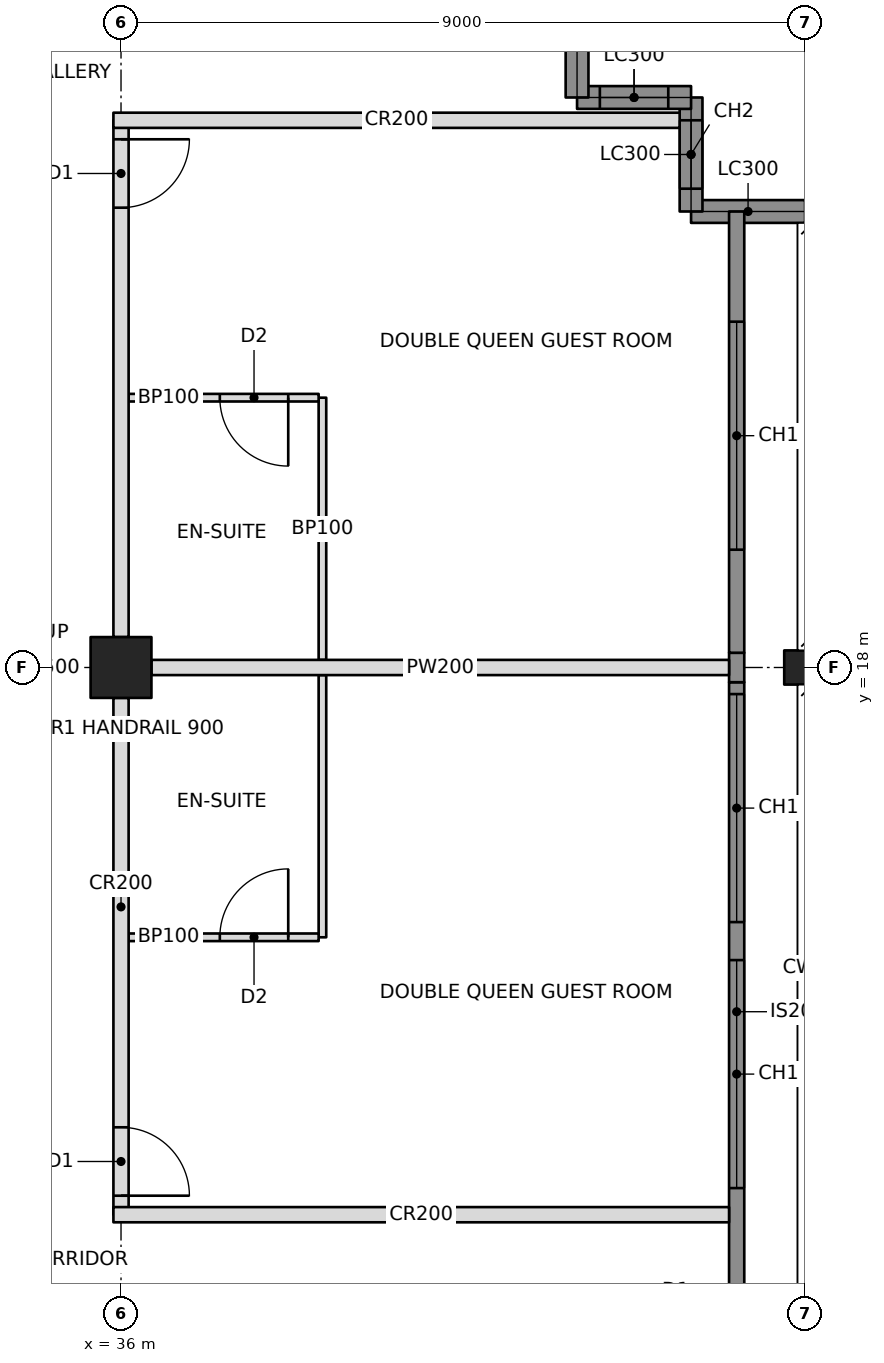
"""IFC4 building model, lengths in metres.
Left out: names, types, materials, properties, quantities, classifications, styles, units other than length and angle.
Written with IfcOpenShell. Run it as: python <this file> out.ifc"""

import sys

from ifc_helpers import new_model, si_unit, direction, frame, frame_2d, origin, origin_2d, place, context, subcontext, project, spatial, rectangle, hollow_rectangle, i_section, extrude, element, fill, save


model = new_model("IFC4")
c1 = context("Model", 3, precision=1e-05, world=origin(), true_north=direction((0.0, 1.0)))
c2 = subcontext(c1, "Body", "Model", "MODEL_VIEW")
j1 = project(units=[si_unit("LENGTHUNIT", "METRE"), si_unit("PLANEANGLEUNIT", "RADIAN")], contexts=[c1])
p1 = place(None, origin())
s1 = spatial("IfcSite", under=j1, at=p1, CompositionType="ELEMENT")
p2 = place(p1, origin())
s2 = spatial("IfcBuilding", under=s1, at=p2, CompositionType="ELEMENT")
p3 = place(p2, frame((0.0, 0.0, 191.0)))
s3 = spatial("IfcBuildingStorey", under=s2, at=p3, CompositionType="ELEMENT", Elevation=191.0)
p4 = place(p3, frame((36.0, 18.0, 0.0), z_axis=(0.0, 0.0, 1.0), x_axis=(0.0, 1.0, 0.0)))
e1 = element("IfcColumn", 1, at=p4, inside=s3, PredefinedType="COLUMN", context=c2, shape_type="SweptSolid", body=[
    extrude(hollow_rectangle(XDim=0.8, YDim=0.8, WallThickness=0.06, at=origin_2d()), origin(), (0.0, 0.0, 1.0), 3.4),
])
p5 = place(p3, frame((45.0, 18.0, 0.0), z_axis=(0.0, 0.0, 1.0), x_axis=(0.0, 1.0, 0.0)))
e2 = element("IfcColumn", 2, at=p5, inside=s3, PredefinedType="COLUMN", context=c2, shape_type="SweptSolid", body=[
    extrude(i_section(OverallWidth=0.449, OverallDepth=0.549, WebThickness=0.072, FlangeThickness=0.115, at=origin_2d()), origin(), (0.0, 0.0, 1.0), 3.4),
])
p6 = place(p3, frame((45.0, 24.0, 0.0), z_axis=(0.0, 0.0, 1.0), x_axis=(-1.0, 0.0, 0.0)))
e3 = element("IfcWall", 3, at=p6, inside=s3, PredefinedType="SOLIDWALL", context=c2, shape_type="SweptSolid", body=[
    extrude(rectangle(XDim=1.5, YDim=0.3, at=frame_2d((0.75, 0.0))), origin(), (0.0, 0.0, 1.0), 2.42),
])
p7 = place(p3, frame((43.5, 24.0, 0.0), z_axis=(0.0, 0.0, 1.0), x_axis=(0.0, 1.0, 0.0)))
e4 = element("IfcWall", 4, at=p7, inside=s3, PredefinedType="SOLIDWALL", context=c2, shape_type="SweptSolid", body=[
    extrude(rectangle(XDim=1.5, YDim=0.3, at=frame_2d((0.75, 0.0))), origin(), (0.0, 0.0, 1.0), 3.2),
])
p8 = place(p7, frame((0.3, 0.0, 0.6)))
e5 = element("IfcOpeningElement", 5, at=p8, cuts=e4, PredefinedType="OPENING", context=c2, shape_type="SweptSolid", body=[
    extrude(rectangle(XDim=0.9, YDim=2.2, at=frame_2d((0.45, 1.1))), frame((0.0, 0.16, 0.0), z_axis=(0.0, -1.0, 0.0), x_axis=(1.0, 0.0, 0.0)), (0.0, 0.0, 1.0), 0.32),
])
p9 = place(p3, frame((43.5, 25.5, 0.0), z_axis=(0.0, 0.0, 1.0), x_axis=(-1.0, 0.0, 0.0)))
e6 = element("IfcWall", 6, at=p9, inside=s3, PredefinedType="SOLIDWALL", context=c2, shape_type="SweptSolid", body=[
    extrude(rectangle(XDim=1.5, YDim=0.3, at=frame_2d((0.75, 0.0))), origin(), (0.0, 0.0, 1.0), 3.2),
])
p10 = place(p9, frame((0.3, 0.0, 0.6)))
e7 = element("IfcOpeningElement", 7, at=p10, cuts=e6, PredefinedType="OPENING", context=c2, shape_type="SweptSolid", body=[
    extrude(rectangle(XDim=0.9, YDim=2.2, at=frame_2d((0.45, 1.1))), frame((0.0, 0.16, 0.0), z_axis=(0.0, -1.0, 0.0), x_axis=(1.0, 0.0, 0.0)), (0.0, 0.0, 1.0), 0.32),
])
p11 = place(p3, frame((42.0, 25.5, 0.0), z_axis=(0.0, 0.0, 1.0), x_axis=(0.0, 1.0, 0.0)))
e8 = element("IfcWall", 8, at=p11, inside=s3, PredefinedType="SOLIDWALL", context=c2, shape_type="SweptSolid", body=[
    extrude(rectangle(XDim=1.5, YDim=0.3, at=frame_2d((0.75, 0.0))), origin(), (0.0, 0.0, 1.0), 2.42),
])
p12 = place(p3, frame((36.0, 10.8, 0.0), z_axis=(0.0, 0.0, 1.0), x_axis=(0.0, 1.0, 0.0)))
e9 = element("IfcWall", 9, at=p12, inside=s3, PredefinedType="PARTITIONING", context=c2, shape_type="SweptSolid", body=[
    extrude(rectangle(XDim=6.8, YDim=0.2, at=frame_2d((3.4, 0.0))), origin(), (0.0, 0.0, 1.0), 2.405),
])
p13 = place(p12, frame((0.25, 0.0, 0.0)))
e10 = element("IfcOpeningElement", 10, at=p13, cuts=e9, PredefinedType="OPENING", context=c2, shape_type="SweptSolid", body=[
    extrude(rectangle(XDim=0.9, YDim=2.1, at=frame_2d((0.45, 1.05))), frame((0.0, 0.11, 0.0), z_axis=(0.0, -1.0, 0.0), x_axis=(1.0, 0.0, 0.0)), (0.0, 0.0, 1.0), 0.22),
])
p14 = place(p3, frame((36.0, 18.4, 0.0), z_axis=(0.0, 0.0, 1.0), x_axis=(0.0, 1.0, 0.0)))
e11 = element("IfcWall", 11, at=p14, inside=s3, PredefinedType="PARTITIONING", context=c2, shape_type="SweptSolid", body=[
    extrude(rectangle(XDim=6.8, YDim=0.2, at=frame_2d((3.4, 0.0))), origin(), (0.0, 0.0, 1.0), 2.405),
])
p15 = place(p14, frame((5.65, 0.0, 0.0)))
e12 = element("IfcOpeningElement", 12, at=p15, cuts=e11, PredefinedType="OPENING", context=c2, shape_type="SweptSolid", body=[
    extrude(rectangle(XDim=0.9, YDim=2.1, at=frame_2d((0.45, 1.05))), frame((0.0, 0.11, 0.0), z_axis=(0.0, -1.0, 0.0), x_axis=(1.0, 0.0, 0.0)), (0.0, 0.0, 1.0), 0.22),
])
p16 = place(p3, frame((35.9, 10.8, 0.0), z_axis=(0.0, 0.0, 1.0), x_axis=(1.0, 0.0, 0.0)))
e13 = element("IfcWall", 13, at=p16, inside=s3, PredefinedType="PARTITIONING", context=c2, shape_type="SweptSolid", body=[
    extrude(rectangle(XDim=8.1, YDim=0.2, at=frame_2d((4.05, 0.0))), origin(), (0.0, 0.0, 1.0), 2.404),
])
p17 = place(p3, frame((35.9, 25.2, 0.0), z_axis=(0.0, 0.0, 1.0), x_axis=(1.0, 0.0, 0.0)))
e14 = element("IfcWall", 14, at=p17, inside=s3, PredefinedType="PARTITIONING", context=c2, shape_type="SweptSolid", body=[
    extrude(rectangle(XDim=7.45, YDim=0.2, at=frame_2d((3.725, 0.0))), origin(), (0.0, 0.0, 1.0), 2.404),
])
p18 = place(p3, frame((36.4, 18.0, 0.0), z_axis=(0.0, 0.0, 1.0), x_axis=(1.0, 0.0, 0.0)))
e15 = element("IfcWall", 15, at=p18, inside=s3, PredefinedType="PARTITIONING", context=c2, shape_type="SweptSolid", body=[
    extrude(rectangle(XDim=7.6, YDim=0.2, at=frame_2d((3.8, 0.0))), origin(), (0.0, 0.0, 1.0), 2.405),
])
p19 = place(p3, frame((38.65, 14.45, 0.0), z_axis=(0.0, 0.0, 1.0), x_axis=(0.0, 1.0, 0.0)))
e16 = element("IfcWall", 16, at=p19, inside=s3, PredefinedType="PARTITIONING", context=c2, shape_type="SweptSolid", body=[
    extrude(rectangle(XDim=3.45, YDim=0.1, at=frame_2d((1.725, 0.0))), origin(), (0.0, 0.0, 1.0), 2.404),
])
p20 = place(p3, frame((36.1, 14.45, 0.0), z_axis=(0.0, 0.0, 1.0), x_axis=(1.0, 0.0, 0.0)))
e17 = element("IfcWall", 17, at=p20, inside=s3, PredefinedType="PARTITIONING", context=c2, shape_type="SweptSolid", body=[
    extrude(rectangle(XDim=2.5, YDim=0.1, at=frame_2d((1.25, 0.0))), origin(), (0.0, 0.0, 1.0), 2.404),
])
p21 = place(p20, frame((1.2, 0.0, 0.0)))
e18 = element("IfcOpeningElement", 18, at=p21, cuts=e17, PredefinedType="OPENING", context=c2, shape_type="SweptSolid", body=[
    extrude(rectangle(XDim=0.9, YDim=2.1, at=frame_2d((0.45, 1.05))), frame((0.0, 0.06, 0.0), z_axis=(0.0, -1.0, 0.0), x_axis=(1.0, 0.0, 0.0)), (0.0, 0.0, 1.0), 0.12),
])
p22 = place(p3, frame((38.65, 18.1, 0.0), z_axis=(0.0, 0.0, 1.0), x_axis=(0.0, 1.0, 0.0)))
e19 = element("IfcWall", 19, at=p22, inside=s3, PredefinedType="PARTITIONING", context=c2, shape_type="SweptSolid", body=[
    extrude(rectangle(XDim=3.45, YDim=0.1, at=frame_2d((1.725, 0.0))), origin(), (0.0, 0.0, 1.0), 2.404),
])
p23 = place(p3, frame((36.1, 21.55, 0.0), z_axis=(0.0, 0.0, 1.0), x_axis=(1.0, 0.0, 0.0)))
e20 = element("IfcWall", 20, at=p23, inside=s3, PredefinedType="PARTITIONING", context=c2, shape_type="SweptSolid", body=[
    extrude(rectangle(XDim=2.5, YDim=0.1, at=frame_2d((1.25, 0.0))), origin(), (0.0, 0.0, 1.0), 2.404),
])
p24 = place(p23, frame((1.2, 0.0, 0.0)))
e21 = element("IfcOpeningElement", 21, at=p24, cuts=e20, PredefinedType="OPENING", context=c2, shape_type="SweptSolid", body=[
    extrude(rectangle(XDim=0.9, YDim=2.1, at=frame_2d((0.45, 1.05))), frame((0.0, 0.06, 0.0), z_axis=(0.0, -1.0, 0.0), x_axis=(1.0, 0.0, 0.0)), (0.0, 0.0, 1.0), 0.12),
])
p25 = place(p3, frame((44.1, 9.135, 0.0), z_axis=(0.0, 0.0, 1.0), x_axis=(0.0, 1.0, 0.0)))
e22 = element("IfcWall", 22, at=p25, inside=s3, PredefinedType="SOLIDWALL", context=c2, shape_type="SweptSolid", body=[
    extrude(rectangle(XDim=8.671, YDim=0.2, at=frame_2d((4.335, 0.0))), origin(), (0.0, 0.0, 1.0), 3.2),
])
p26 = place(p25, frame((2.015, 0.0, 0.6)))
e23 = element("IfcOpeningElement", 23, at=p26, cuts=e22, PredefinedType="OPENING", context=c2, shape_type="SweptSolid", body=[
    extrude(rectangle(XDim=3.0, YDim=2.2, at=frame_2d((1.5, 1.1))), frame((0.0, 0.11, 0.0), z_axis=(0.0, -1.0, 0.0), x_axis=(1.0, 0.0, 0.0)), (0.0, 0.0, 1.0), 0.22),
])
p27 = place(p25, frame((5.515, 0.0, 0.6)))
e24 = element("IfcOpeningElement", 24, at=p27, cuts=e22, PredefinedType="OPENING", context=c2, shape_type="SweptSolid", body=[
    extrude(rectangle(XDim=3.0, YDim=2.2, at=frame_2d((1.5, 1.1))), frame((0.0, 0.11, 0.0), z_axis=(0.0, -1.0, 0.0), x_axis=(1.0, 0.0, 0.0)), (0.0, 0.0, 1.0), 0.22),
])
p28 = place(p3, frame((44.1, 17.806, 0.0), z_axis=(0.0, 0.0, 1.0), x_axis=(0.0, 1.0, 0.0)))
e25 = element("IfcWall", 25, at=p28, inside=s3, PredefinedType="SOLIDWALL", context=c2, shape_type="SweptSolid", body=[
    extrude(rectangle(XDim=0.388, YDim=0.2, at=frame_2d((0.194, 0.0))), origin(), (0.0, 0.0, 1.0), 2.404),
])
p29 = place(p3, frame((44.1, 18.194, 0.0), z_axis=(0.0, 0.0, 1.0), x_axis=(0.0, 1.0, 0.0)))
e26 = element("IfcWall", 26, at=p29, inside=s3, PredefinedType="SOLIDWALL", context=c2, shape_type="SweptSolid", body=[
    extrude(rectangle(XDim=5.806, YDim=0.2, at=frame_2d((2.903, 0.0))), origin(), (0.0, 0.0, 1.0), 3.2),
])
p30 = place(p29, frame((1.356, 0.0, 0.6)))
e27 = element("IfcOpeningElement", 27, at=p30, cuts=e26, PredefinedType="OPENING", context=c2, shape_type="SweptSolid", body=[
    extrude(rectangle(XDim=3.0, YDim=2.2, at=frame_2d((1.5, 1.1))), frame((0.0, 0.11, 0.0), z_axis=(0.0, -1.0, 0.0), x_axis=(1.0, 0.0, 0.0)), (0.0, 0.0, 1.0), 0.22),
])
p31 = place(p8, origin())
e28 = element("IfcWindow", 28, at=p31, inside=s3, PartitioningType="SINGLE_PANEL", PredefinedType="WINDOW", context=c2, shape_type="SweptSolid", body=[
    extrude(rectangle(XDim=0.9, YDim=2.2, at=frame_2d((0.45, 1.1))), frame((0.0, 0.03, 0.0), z_axis=(0.0, -1.0, 0.0), x_axis=(1.0, 0.0, 0.0)), (0.0, 0.0, 1.0), 0.06),
])
fill(e5, e28)
p32 = place(p10, origin())
e29 = element("IfcWindow", 29, at=p32, inside=s3, PartitioningType="SINGLE_PANEL", PredefinedType="WINDOW", context=c2, shape_type="SweptSolid", body=[
    extrude(rectangle(XDim=0.9, YDim=2.2, at=frame_2d((0.45, 1.1))), frame((0.0, 0.03, 0.0), z_axis=(0.0, -1.0, 0.0), x_axis=(1.0, 0.0, 0.0)), (0.0, 0.0, 1.0), 0.06),
])
fill(e7, e29)
p33 = place(p26, origin())
e30 = element("IfcWindow", 30, at=p33, inside=s3, PartitioningType="TRIPLE_PANEL_VERTICAL", PredefinedType="WINDOW", context=c2, shape_type="SweptSolid", body=[
    extrude(rectangle(XDim=3.0, YDim=2.2, at=frame_2d((1.5, 1.1))), frame((0.0, 0.03, 0.0), z_axis=(0.0, -1.0, 0.0), x_axis=(1.0, 0.0, 0.0)), (0.0, 0.0, 1.0), 0.06),
])
fill(e23, e30)
p34 = place(p27, origin())
e31 = element("IfcWindow", 31, at=p34, inside=s3, PartitioningType="TRIPLE_PANEL_VERTICAL", PredefinedType="WINDOW", context=c2, shape_type="SweptSolid", body=[
    extrude(rectangle(XDim=3.0, YDim=2.2, at=frame_2d((1.5, 1.1))), frame((0.0, 0.03, 0.0), z_axis=(0.0, -1.0, 0.0), x_axis=(1.0, 0.0, 0.0)), (0.0, 0.0, 1.0), 0.06),
])
fill(e24, e31)
p35 = place(p30, origin())
e32 = element("IfcWindow", 32, at=p35, inside=s3, PartitioningType="TRIPLE_PANEL_VERTICAL", PredefinedType="WINDOW", context=c2, shape_type="SweptSolid", body=[
    extrude(rectangle(XDim=3.0, YDim=2.2, at=frame_2d((1.5, 1.1))), frame((0.0, 0.03, 0.0), z_axis=(0.0, -1.0, 0.0), x_axis=(1.0, 0.0, 0.0)), (0.0, 0.0, 1.0), 0.06),
])
fill(e27, e32)
p36 = place(p21, origin())
e33 = element("IfcDoor", 33, at=p36, inside=s3, OperationType="SINGLE_SWING_RIGHT", PredefinedType="DOOR", context=c2, shape_type="SweptSolid", body=[
    extrude(rectangle(XDim=0.9, YDim=2.1, at=frame_2d((0.45, 1.05))), frame((0.0, 0.025, 0.0), z_axis=(0.0, -1.0, 0.0), x_axis=(1.0, 0.0, 0.0)), (0.0, 0.0, 1.0), 0.05),
])
fill(e18, e33)
p37 = place(p13, frame((0.9, 0.0, 0.0), z_axis=(0.0, 0.0, 1.0), x_axis=(-1.0, 0.0, 0.0)))
e34 = element("IfcDoor", 34, at=p37, inside=s3, OperationType="SINGLE_SWING_RIGHT", PredefinedType="DOOR", context=c2, shape_type="SweptSolid", body=[
    extrude(rectangle(XDim=0.9, YDim=2.1, at=frame_2d((0.45, 1.05))), frame((0.0, 0.025, 0.0), z_axis=(0.0, -1.0, 0.0), x_axis=(1.0, 0.0, 0.0)), (0.0, 0.0, 1.0), 0.05),
])
fill(e10, e34)
p38 = place(p24, frame((0.9, 0.0, 0.0), z_axis=(0.0, 0.0, 1.0), x_axis=(-1.0, 0.0, 0.0)))
e35 = element("IfcDoor", 35, at=p38, inside=s3, OperationType="SINGLE_SWING_LEFT", PredefinedType="DOOR", context=c2, shape_type="SweptSolid", body=[
    extrude(rectangle(XDim=0.9, YDim=2.1, at=frame_2d((0.45, 1.05))), frame((0.0, 0.025, 0.0), z_axis=(0.0, -1.0, 0.0), x_axis=(1.0, 0.0, 0.0)), (0.0, 0.0, 1.0), 0.05),
])
fill(e21, e35)
p39 = place(p15, frame((0.9, 0.0, 0.0), z_axis=(0.0, 0.0, 1.0), x_axis=(-1.0, 0.0, 0.0)))
e36 = element("IfcDoor", 36, at=p39, inside=s3, OperationType="SINGLE_SWING_LEFT", PredefinedType="DOOR", context=c2, shape_type="SweptSolid", body=[
    extrude(rectangle(XDim=0.9, YDim=2.1, at=frame_2d((0.45, 1.05))), frame((0.0, 0.025, 0.0), z_axis=(0.0, -1.0, 0.0), x_axis=(1.0, 0.0, 0.0)), (0.0, 0.0, 1.0), 0.05),
])
fill(e12, e36)
save(model, sys.argv[1])
